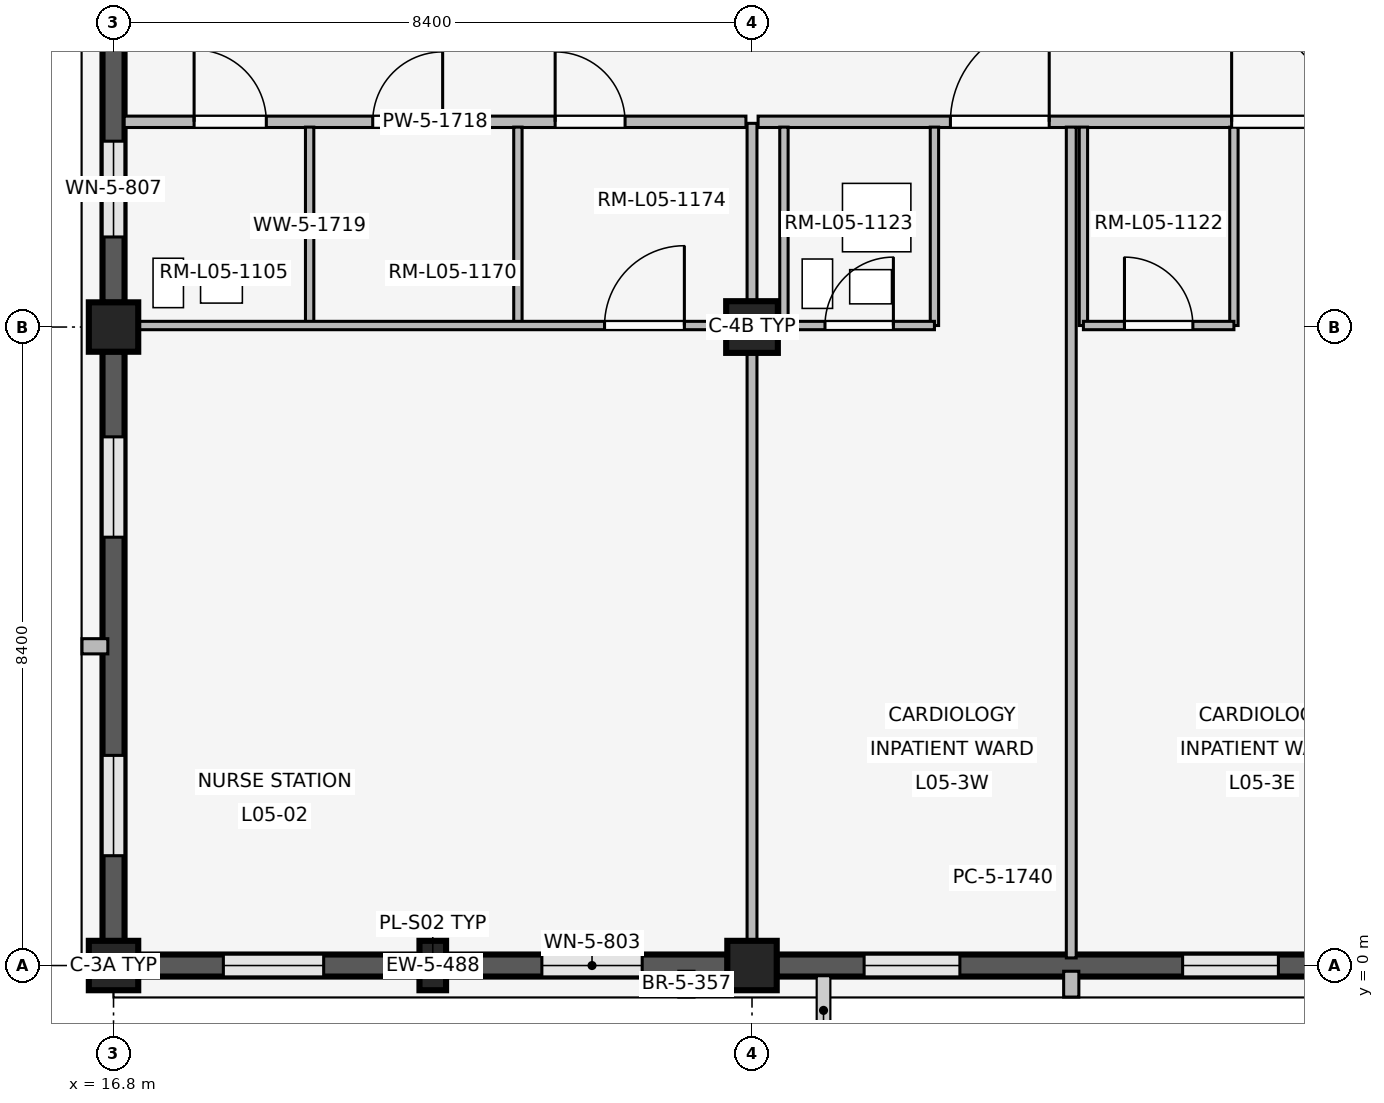
"""IFC4 building model, lengths in metres.
Left out: names, types, materials, properties, quantities, classifications, styles, units other than length and angle.
Written with IfcOpenShell. Run it as: python <this file> out.ifc"""

import sys

from ifc_helpers import new_model, si_unit, direction, frame, frame_2d, origin, origin_2d, place, context, subcontext, project, spatial, rectangle, extrude, element, fill, save


model = new_model("IFC4")
c1 = context("Model", 3, precision=1e-05, world=origin(), true_north=direction((0.0, 1.0)))
c2 = subcontext(c1, "Body", "Model", "MODEL_VIEW")
j1 = project(units=[si_unit("LENGTHUNIT", "METRE"), si_unit("PLANEANGLEUNIT", "RADIAN")], contexts=[c1])
p1 = place(None, origin())
s1 = spatial("IfcSite", under=j1, at=p1, CompositionType="ELEMENT")
p2 = place(p1, origin())
s2 = spatial("IfcBuilding", under=s1, at=p2, CompositionType="ELEMENT")
p3 = place(p2, frame((0.0, 0.0, 20.4)))
s3 = spatial("IfcBuildingStorey", under=s2, at=p3, CompositionType="ELEMENT", Elevation=20.4)
for number, where, z_axis, x_axis in (
    (1, (16.8, 0.0, 0.0), (0.0, 0.0, 1.0), (1.0, 0.0, 0.0)),
    (2, (16.8, 8.4, 0.0), (0.0, 0.0, 1.0), (1.0, 0.0, 0.0)),
    (3, (25.2, 0.0, 0.0), (0.0, 0.0, 1.0), (1.0, 0.0, 0.0)),
):
    element("IfcColumn", number, at=place(p3, frame(where, z_axis=z_axis, x_axis=x_axis)), inside=s3, PredefinedType="COLUMN", context=c2, shape_type="SweptSolid", body=[
        extrude(rectangle(XDim=0.65, YDim=0.65, at=origin_2d()), origin(), (0.0, 0.0, 1.0), 4.2),
    ])
p4 = place(p3, frame((25.2, 8.4, 0.0), z_axis=(0.0, 0.0, 1.0), x_axis=(1.0, 0.0, 0.0)))
e4 = element("IfcColumn", 4, at=p4, inside=s3, PredefinedType="COLUMN", context=c2, shape_type="SweptSolid", body=[
    extrude(rectangle(XDim=0.68, YDim=0.68, at=origin_2d()), origin(), (0.0, 0.0, 1.0), 4.2),
])
p5 = place(p3, frame((21.0, 0.0, 0.0), z_axis=(0.0, 0.0, 1.0), x_axis=(1.0, 0.0, 0.0)))
e5 = element("IfcColumn", 5, at=p5, inside=s3, PredefinedType="PILASTER", context=c2, shape_type="SweptSolid", body=[
    extrude(rectangle(XDim=0.35, YDim=0.65, at=origin_2d()), origin(), (0.0, 0.0, 1.0), 4.2),
])
p6 = place(p3, frame((24.88, 0.0, 0.0), z_axis=(0.0, 0.0, 1.0), x_axis=(-1.0, 0.0, 0.0)))
e6 = element("IfcWall", 6, at=p6, inside=s3, PredefinedType="SOLIDWALL", context=c2, shape_type="SweptSolid", body=[
    extrude(rectangle(XDim=7.76, YDim=0.29, at=frame_2d((3.88, 0.0))), origin(), (0.0, 0.0, 1.0), 3.34),
])
p7 = place(p6, frame((1.125, 0.0, 0.85)))
e7 = element("IfcOpeningElement", 7, at=p7, cuts=e6, PredefinedType="OPENING", context=c2, shape_type="SweptSolid", body=[
    extrude(rectangle(XDim=1.32, YDim=1.58, at=frame_2d((0.66, 0.79))), frame((0.0, 0.155, 0.0), z_axis=(0.0, -1.0, 0.0), x_axis=(1.0, 0.0, 0.0)), (0.0, 0.0, 1.0), 0.31),
])
p8 = place(p6, frame((5.315, 0.0, 0.85)))
e8 = element("IfcOpeningElement", 8, at=p8, cuts=e6, PredefinedType="OPENING", context=c2, shape_type="SweptSolid", body=[
    extrude(rectangle(XDim=1.32, YDim=1.58, at=frame_2d((0.66, 0.79))), frame((0.0, 0.155, 0.0), z_axis=(0.0, -1.0, 0.0), x_axis=(1.0, 0.0, 0.0)), (0.0, 0.0, 1.0), 0.31),
])
p9 = place(p3, frame((24.337, -0.075, 0.0), z_axis=(0.0, 0.0, 1.0), x_axis=(0.0, -1.0, 0.0)))
e9 = element("IfcWall", 9, at=p9, inside=s3, PredefinedType="ELEMENTEDWALL", context=c2, shape_type="SweptSolid", body=[
    extrude(rectangle(XDim=0.34, YDim=0.2, at=frame_2d((0.17, 0.0))), origin(), (0.0, 0.0, 1.0), 3.32),
])
p10 = place(p3, frame((16.8, 0.32, 0.0), z_axis=(0.0, 0.0, 1.0), x_axis=(0.0, 1.0, 0.0)))
e10 = element("IfcWall", 10, at=p10, inside=s3, PredefinedType="SOLIDWALL", context=c2, shape_type="SweptSolid", body=[
    extrude(rectangle(XDim=7.76, YDim=0.29, at=frame_2d((3.88, 0.0))), origin(), (0.0, 0.0, 1.0), 3.34),
])
p11 = place(p10, frame((1.125, 0.0, 0.85)))
e11 = element("IfcOpeningElement", 11, at=p11, cuts=e10, PredefinedType="OPENING", context=c2, shape_type="SweptSolid", body=[
    extrude(rectangle(XDim=1.32, YDim=1.58, at=frame_2d((0.66, 0.79))), frame((0.0, 0.155, 0.0), z_axis=(0.0, -1.0, 0.0), x_axis=(1.0, 0.0, 0.0)), (0.0, 0.0, 1.0), 0.31),
])
p12 = place(p10, frame((5.315, 0.0, 0.85)))
e12 = element("IfcOpeningElement", 12, at=p12, cuts=e10, PredefinedType="OPENING", context=c2, shape_type="SweptSolid", body=[
    extrude(rectangle(XDim=1.32, YDim=1.58, at=frame_2d((0.66, 0.79))), frame((0.0, 0.155, 0.0), z_axis=(0.0, -1.0, 0.0), x_axis=(1.0, 0.0, 0.0)), (0.0, 0.0, 1.0), 0.31),
])
p13 = place(p3, frame((16.725, 4.2, 0.0), z_axis=(0.0, 0.0, 1.0), x_axis=(-1.0, 0.0, 0.0)))
e13 = element("IfcWall", 13, at=p13, inside=s3, PredefinedType="ELEMENTEDWALL", context=c2, shape_type="SweptSolid", body=[
    extrude(rectangle(XDim=0.34, YDim=0.2, at=frame_2d((0.17, 0.0))), origin(), (0.0, 0.0, 1.0), 3.32),
])
p14 = place(p3, frame((16.8, 8.72, 0.0), z_axis=(0.0, 0.0, 1.0), x_axis=(0.0, 1.0, 0.0)))
e14 = element("IfcWall", 14, at=p14, inside=s3, PredefinedType="SOLIDWALL", context=c2, shape_type="SweptSolid", body=[
    extrude(rectangle(XDim=7.76, YDim=0.29, at=frame_2d((3.88, 0.0))), origin(), (0.0, 0.0, 1.0), 3.34),
])
p15 = place(p14, frame((0.865, 0.0, 0.85)))
e15 = element("IfcOpeningElement", 15, at=p15, cuts=e14, PredefinedType="OPENING", context=c2, shape_type="SweptSolid", body=[
    extrude(rectangle(XDim=1.26, YDim=1.52, at=frame_2d((0.63, 0.76))), frame((0.0, 0.155, 0.0), z_axis=(0.0, -1.0, 0.0), x_axis=(1.0, 0.0, 0.0)), (0.0, 0.0, 1.0), 0.31),
])
p16 = place(p14, frame((5.685, 0.0, 0.85)))
e16 = element("IfcOpeningElement", 16, at=p16, cuts=e14, PredefinedType="OPENING", context=c2, shape_type="SweptSolid", body=[
    extrude(rectangle(XDim=1.26, YDim=1.52, at=frame_2d((0.63, 0.76))), frame((0.0, 0.155, 0.0), z_axis=(0.0, -1.0, 0.0), x_axis=(1.0, 0.0, 0.0)), (0.0, 0.0, 1.0), 0.31),
])
p17 = place(p3, frame((33.28, 0.0, 0.0), z_axis=(0.0, 0.0, 1.0), x_axis=(-1.0, 0.0, 0.0)))
e17 = element("IfcWall", 17, at=p17, inside=s3, PredefinedType="SOLIDWALL", context=c2, shape_type="SweptSolid", body=[
    extrude(rectangle(XDim=7.76, YDim=0.29, at=frame_2d((3.88, 0.0))), origin(), (0.0, 0.0, 1.0), 3.34),
])
p18 = place(p17, frame((1.155, 0.0, 0.85)))
e18 = element("IfcOpeningElement", 18, at=p18, cuts=e17, PredefinedType="OPENING", context=c2, shape_type="SweptSolid", body=[
    extrude(rectangle(XDim=1.26, YDim=1.52, at=frame_2d((0.63, 0.76))), frame((0.0, 0.155, 0.0), z_axis=(0.0, -1.0, 0.0), x_axis=(1.0, 0.0, 0.0)), (0.0, 0.0, 1.0), 0.31),
])
p19 = place(p17, frame((5.345, 0.0, 0.85)))
e19 = element("IfcOpeningElement", 19, at=p19, cuts=e17, PredefinedType="OPENING", context=c2, shape_type="SweptSolid", body=[
    extrude(rectangle(XDim=1.26, YDim=1.52, at=frame_2d((0.63, 0.76))), frame((0.0, 0.155, 0.0), z_axis=(0.0, -1.0, 0.0), x_axis=(1.0, 0.0, 0.0)), (0.0, 0.0, 1.0), 0.31),
])
p20 = place(p3, frame((29.4, -0.075, 0.0), z_axis=(0.0, 0.0, 1.0), x_axis=(0.0, -1.0, 0.0)))
e20 = element("IfcWall", 20, at=p20, inside=s3, PredefinedType="ELEMENTEDWALL", context=c2, shape_type="SweptSolid", body=[
    extrude(rectangle(XDim=0.34, YDim=0.2, at=frame_2d((0.17, 0.0))), origin(), (0.0, 0.0, 1.0), 3.32),
])
p21 = place(p3, frame((16.94, 11.1, 0.0), z_axis=(0.0, 0.0, 1.0), x_axis=(1.0, 0.0, 0.0)))
e21 = element("IfcWall", 21, at=p21, inside=s3, PredefinedType="PARTITIONING", context=c2, shape_type="SweptSolid", body=[
    extrude(rectangle(XDim=8.18, YDim=0.15, at=frame_2d((4.09, 0.0))), origin(), (0.0, 0.0, 1.0), 3.32),
])
p22 = place(p21, frame((0.92, 0.0, 0.0)))
e22 = element("IfcOpeningElement", 22, at=p22, cuts=e21, PredefinedType="OPENING", context=c2, shape_type="SweptSolid", body=[
    extrude(rectangle(XDim=0.95, YDim=2.15, at=frame_2d((0.475, 1.075))), frame((0.0, 0.085, 0.0), z_axis=(0.0, -1.0, 0.0), x_axis=(1.0, 0.0, 0.0)), (0.0, 0.0, 1.0), 0.17),
])
p23 = place(p21, frame((3.27, 0.0, 0.0)))
e23 = element("IfcOpeningElement", 23, at=p23, cuts=e21, PredefinedType="OPENING", context=c2, shape_type="SweptSolid", body=[
    extrude(rectangle(XDim=0.92, YDim=2.1, at=frame_2d((0.46, 1.05))), frame((0.0, 0.085, 0.0), z_axis=(0.0, -1.0, 0.0), x_axis=(1.0, 0.0, 0.0)), (0.0, 0.0, 1.0), 0.17),
])
p24 = place(p21, frame((5.67, 0.0, 0.0)))
e24 = element("IfcOpeningElement", 24, at=p24, cuts=e21, PredefinedType="OPENING", context=c2, shape_type="SweptSolid", body=[
    extrude(rectangle(XDim=0.92, YDim=2.1, at=frame_2d((0.46, 1.05))), frame((0.0, 0.085, 0.0), z_axis=(0.0, -1.0, 0.0), x_axis=(1.0, 0.0, 0.0)), (0.0, 0.0, 1.0), 0.17),
])
for number, where, z_axis, x_axis in (
    (25, (19.38, 8.44, 0.0), (0.0, 0.0, 1.0), (0.0, 1.0, 0.0)),
    (26, (22.12, 8.44, 0.0), (0.0, 0.0, 1.0), (0.0, 1.0, 0.0)),
):
    element("IfcWall", number, at=place(p3, frame(where, z_axis=z_axis, x_axis=x_axis)), inside=s3, PredefinedType="PARTITIONING", context=c2, shape_type="SweptSolid", body=[
        extrude(rectangle(XDim=2.59, YDim=0.11, at=frame_2d((1.295, 0.0))), origin(), (0.0, 0.0, 1.0), 3.32),
    ])
p25 = place(p3, frame((16.94, 8.42, 0.0), z_axis=(0.0, 0.0, 1.0), x_axis=(1.0, 0.0, 0.0)))
e27 = element("IfcWall", 27, at=p25, inside=s3, PredefinedType="PARTITIONING", context=c2, shape_type="SweptSolid", body=[
    extrude(rectangle(XDim=8.18, YDim=0.11, at=frame_2d((4.09, 0.0))), origin(), (0.0, 0.0, 1.0), 3.32),
])
p26 = place(p25, frame((6.32, 0.0, 0.0)))
e28 = element("IfcOpeningElement", 28, at=p26, cuts=e27, PredefinedType="OPENING", context=c2, shape_type="SweptSolid", body=[
    extrude(rectangle(XDim=1.05, YDim=2.2, at=frame_2d((0.525, 1.1))), frame((0.0, 0.065, 0.0), z_axis=(0.0, -1.0, 0.0), x_axis=(1.0, 0.0, 0.0)), (0.0, 0.0, 1.0), 0.13),
])
p27 = place(p3, frame((25.2, 0.14, 0.0), z_axis=(0.0, 0.0, 1.0), x_axis=(0.0, 1.0, 0.0)))
e29 = element("IfcWall", 29, at=p27, inside=s3, PredefinedType="PARTITIONING", context=c2, shape_type="SweptSolid", body=[
    extrude(rectangle(XDim=10.94, YDim=0.13, at=frame_2d((5.47, 0.0))), origin(), (0.0, 0.0, 1.0), 3.32),
])
p28 = place(p3, frame((25.28, 11.1, 0.0), z_axis=(0.0, 0.0, 1.0), x_axis=(1.0, 0.0, 0.0)))
e30 = element("IfcWall", 30, at=p28, inside=s3, PredefinedType="PARTITIONING", context=c2, shape_type="SweptSolid", body=[
    extrude(rectangle(XDim=8.24, YDim=0.15, at=frame_2d((4.12, 0.0))), origin(), (0.0, 0.0, 1.0), 3.32),
])
p29 = place(p28, frame((2.53, 0.0, 0.0)))
e31 = element("IfcOpeningElement", 31, at=p29, cuts=e30, PredefinedType="OPENING", context=c2, shape_type="SweptSolid", body=[
    extrude(rectangle(XDim=1.3, YDim=2.25, at=frame_2d((0.65, 1.125))), frame((0.0, 0.085, 0.0), z_axis=(0.0, -1.0, 0.0), x_axis=(1.0, 0.0, 0.0)), (0.0, 0.0, 1.0), 0.17),
])
p30 = place(p28, frame((6.23, 0.0, 0.0)))
e32 = element("IfcOpeningElement", 32, at=p30, cuts=e30, PredefinedType="OPENING", context=c2, shape_type="SweptSolid", body=[
    extrude(rectangle(XDim=1.3, YDim=2.25, at=frame_2d((0.65, 1.125))), frame((0.0, 0.085, 0.0), z_axis=(0.0, -1.0, 0.0), x_axis=(1.0, 0.0, 0.0)), (0.0, 0.0, 1.0), 0.17),
])
p31 = place(p3, frame((29.4, 0.1, 0.0), z_axis=(0.0, 0.0, 1.0), x_axis=(0.0, 1.0, 0.0)))
e33 = element("IfcWall", 33, at=p31, inside=s3, PredefinedType="PARTITIONING", context=c2, shape_type="SweptSolid", body=[
    extrude(rectangle(XDim=10.93, YDim=0.13, at=frame_2d((5.465, 0.0))), origin(), (0.0, 0.0, 1.0), 3.32),
])
for number, where, z_axis, x_axis in (
    (34, (25.62, 8.42, 0.0), (0.0, 0.0, 1.0), (0.0, 1.0, 0.0)),
    (35, (27.6, 8.42, 0.0), (0.0, 0.0, 1.0), (0.0, 1.0, 0.0)),
):
    element("IfcWall", number, at=place(p3, frame(where, z_axis=z_axis, x_axis=x_axis)), inside=s3, PredefinedType="PARTITIONING", context=c2, shape_type="SweptSolid", body=[
        extrude(rectangle(XDim=2.61, YDim=0.11, at=frame_2d((1.305, 0.0))), origin(), (0.0, 0.0, 1.0), 3.32),
    ])
p32 = place(p3, frame((25.62, 8.42, 0.0), z_axis=(0.0, 0.0, 1.0), x_axis=(1.0, 0.0, 0.0)))
e36 = element("IfcWall", 36, at=p32, inside=s3, PredefinedType="PARTITIONING", context=c2, shape_type="SweptSolid", body=[
    extrude(rectangle(XDim=1.98, YDim=0.11, at=frame_2d((0.99, 0.0))), origin(), (0.0, 0.0, 1.0), 3.32),
])
p33 = place(p32, frame((0.54, 0.0, 0.0)))
e37 = element("IfcOpeningElement", 37, at=p33, cuts=e36, PredefinedType="OPENING", context=c2, shape_type="SweptSolid", body=[
    extrude(rectangle(XDim=0.9, YDim=2.1, at=frame_2d((0.45, 1.05))), frame((0.0, 0.065, 0.0), z_axis=(0.0, -1.0, 0.0), x_axis=(1.0, 0.0, 0.0)), (0.0, 0.0, 1.0), 0.13),
])
for number, where, z_axis, x_axis in (
    (38, (29.56, 8.42, 0.0), (0.0, 0.0, 1.0), (0.0, 1.0, 0.0)),
    (39, (31.54, 8.42, 0.0), (0.0, 0.0, 1.0), (0.0, 1.0, 0.0)),
):
    element("IfcWall", number, at=place(p3, frame(where, z_axis=z_axis, x_axis=x_axis)), inside=s3, PredefinedType="PARTITIONING", context=c2, shape_type="SweptSolid", body=[
        extrude(rectangle(XDim=2.61, YDim=0.11, at=frame_2d((1.305, 0.0))), origin(), (0.0, 0.0, 1.0), 3.32),
    ])
p34 = place(p3, frame((29.56, 8.42, 0.0), z_axis=(0.0, 0.0, 1.0), x_axis=(1.0, 0.0, 0.0)))
e40 = element("IfcWall", 40, at=p34, inside=s3, PredefinedType="PARTITIONING", context=c2, shape_type="SweptSolid", body=[
    extrude(rectangle(XDim=1.98, YDim=0.11, at=frame_2d((0.99, 0.0))), origin(), (0.0, 0.0, 1.0), 3.32),
])
p35 = place(p34, frame((0.54, 0.0, 0.0)))
e41 = element("IfcOpeningElement", 41, at=p35, cuts=e40, PredefinedType="OPENING", context=c2, shape_type="SweptSolid", body=[
    extrude(rectangle(XDim=0.9, YDim=2.1, at=frame_2d((0.45, 1.05))), frame((0.0, 0.065, 0.0), z_axis=(0.0, -1.0, 0.0), x_axis=(1.0, 0.0, 0.0)), (0.0, 0.0, 1.0), 0.13),
])
p36 = place(p3, frame((28.05, 1.15, 0.0), z_axis=(0.0, 0.0, 1.0), x_axis=(1.0, 0.0, 0.0)))
e42 = element("IfcWall", 42, at=p36, inside=s3, PredefinedType="PLUMBINGWALL", context=c2, shape_type="SweptSolid", body=[
    extrude(rectangle(XDim=0.9, YDim=0.24, at=frame_2d((0.45, 0.0))), origin(), (0.0, 0.0, 1.0), 3.32),
])
p37 = place(p7, origin())
e43 = element("IfcWindow", 43, at=p37, inside=s3, PartitioningType="SINGLE_PANEL", PredefinedType="WINDOW", context=c2, shape_type="SweptSolid", body=[
    extrude(rectangle(XDim=1.32, YDim=1.58, at=frame_2d((0.66, 0.79))), frame((0.0, 0.03, 0.0), z_axis=(0.0, -1.0, 0.0), x_axis=(1.0, 0.0, 0.0)), (0.0, 0.0, 1.0), 0.06),
])
fill(e7, e43)
p38 = place(p8, origin())
e44 = element("IfcWindow", 44, at=p38, inside=s3, PartitioningType="SINGLE_PANEL", PredefinedType="WINDOW", context=c2, shape_type="SweptSolid", body=[
    extrude(rectangle(XDim=1.32, YDim=1.58, at=frame_2d((0.66, 0.79))), frame((0.0, 0.03, 0.0), z_axis=(0.0, -1.0, 0.0), x_axis=(1.0, 0.0, 0.0)), (0.0, 0.0, 1.0), 0.06),
])
fill(e8, e44)
p39 = place(p11, origin())
e45 = element("IfcWindow", 45, at=p39, inside=s3, PartitioningType="SINGLE_PANEL", PredefinedType="WINDOW", context=c2, shape_type="SweptSolid", body=[
    extrude(rectangle(XDim=1.32, YDim=1.58, at=frame_2d((0.66, 0.79))), frame((0.0, 0.03, 0.0), z_axis=(0.0, -1.0, 0.0), x_axis=(1.0, 0.0, 0.0)), (0.0, 0.0, 1.0), 0.06),
])
fill(e11, e45)
p40 = place(p12, origin())
e46 = element("IfcWindow", 46, at=p40, inside=s3, PartitioningType="SINGLE_PANEL", PredefinedType="WINDOW", context=c2, shape_type="SweptSolid", body=[
    extrude(rectangle(XDim=1.32, YDim=1.58, at=frame_2d((0.66, 0.79))), frame((0.0, 0.03, 0.0), z_axis=(0.0, -1.0, 0.0), x_axis=(1.0, 0.0, 0.0)), (0.0, 0.0, 1.0), 0.06),
])
fill(e12, e46)
p41 = place(p15, origin())
e47 = element("IfcWindow", 47, at=p41, inside=s3, PartitioningType="SINGLE_PANEL", PredefinedType="WINDOW", context=c2, shape_type="SweptSolid", body=[
    extrude(rectangle(XDim=1.26, YDim=1.52, at=frame_2d((0.63, 0.76))), frame((0.0, 0.03, 0.0), z_axis=(0.0, -1.0, 0.0), x_axis=(1.0, 0.0, 0.0)), (0.0, 0.0, 1.0), 0.06),
])
fill(e15, e47)
p42 = place(p18, origin())
e48 = element("IfcWindow", 48, at=p42, inside=s3, PartitioningType="SINGLE_PANEL", PredefinedType="WINDOW", context=c2, shape_type="SweptSolid", body=[
    extrude(rectangle(XDim=1.26, YDim=1.52, at=frame_2d((0.63, 0.76))), frame((0.0, 0.03, 0.0), z_axis=(0.0, -1.0, 0.0), x_axis=(1.0, 0.0, 0.0)), (0.0, 0.0, 1.0), 0.06),
])
fill(e18, e48)
p43 = place(p19, origin())
e49 = element("IfcWindow", 49, at=p43, inside=s3, PartitioningType="SINGLE_PANEL", PredefinedType="WINDOW", context=c2, shape_type="SweptSolid", body=[
    extrude(rectangle(XDim=1.26, YDim=1.52, at=frame_2d((0.63, 0.76))), frame((0.0, 0.03, 0.0), z_axis=(0.0, -1.0, 0.0), x_axis=(1.0, 0.0, 0.0)), (0.0, 0.0, 1.0), 0.06),
])
fill(e19, e49)
p44 = place(p22, origin())
e50 = element("IfcDoor", 50, at=p44, inside=s3, OperationType="SINGLE_SWING_LEFT", PredefinedType="DOOR", context=c2, shape_type="SweptSolid", body=[
    extrude(rectangle(XDim=0.95, YDim=2.15, at=frame_2d((0.475, 1.075))), frame((0.0, 0.025, 0.0), z_axis=(0.0, -1.0, 0.0), x_axis=(1.0, 0.0, 0.0)), (0.0, 0.0, 1.0), 0.05),
])
fill(e22, e50)
p45 = place(p23, origin())
e51 = element("IfcDoor", 51, at=p45, inside=s3, OperationType="SINGLE_SWING_RIGHT", PredefinedType="DOOR", context=c2, shape_type="SweptSolid", body=[
    extrude(rectangle(XDim=0.92, YDim=2.1, at=frame_2d((0.46, 1.05))), frame((0.0, 0.025, 0.0), z_axis=(0.0, -1.0, 0.0), x_axis=(1.0, 0.0, 0.0)), (0.0, 0.0, 1.0), 0.05),
])
fill(e23, e51)
p46 = place(p24, origin())
e52 = element("IfcDoor", 52, at=p46, inside=s3, OperationType="SINGLE_SWING_LEFT", PredefinedType="DOOR", context=c2, shape_type="SweptSolid", body=[
    extrude(rectangle(XDim=0.92, YDim=2.1, at=frame_2d((0.46, 1.05))), frame((0.0, 0.025, 0.0), z_axis=(0.0, -1.0, 0.0), x_axis=(1.0, 0.0, 0.0)), (0.0, 0.0, 1.0), 0.05),
])
fill(e24, e52)
p47 = place(p26, origin())
e53 = element("IfcDoor", 53, at=p47, inside=s3, OperationType="SINGLE_SWING_RIGHT", PredefinedType="DOOR", context=c2, shape_type="SweptSolid", body=[
    extrude(rectangle(XDim=1.05, YDim=2.2, at=frame_2d((0.525, 1.1))), frame((0.0, 0.025, 0.0), z_axis=(0.0, -1.0, 0.0), x_axis=(1.0, 0.0, 0.0)), (0.0, 0.0, 1.0), 0.05),
])
fill(e28, e53)
p48 = place(p29, origin())
e54 = element("IfcDoor", 54, at=p48, inside=s3, OperationType="SINGLE_SWING_RIGHT", PredefinedType="DOOR", context=c2, shape_type="SweptSolid", body=[
    extrude(rectangle(XDim=1.3, YDim=2.25, at=frame_2d((0.65, 1.125))), frame((0.0, 0.025, 0.0), z_axis=(0.0, -1.0, 0.0), x_axis=(1.0, 0.0, 0.0)), (0.0, 0.0, 1.0), 0.05),
])
fill(e31, e54)
p49 = place(p30, origin())
e55 = element("IfcDoor", 55, at=p49, inside=s3, OperationType="SINGLE_SWING_LEFT", PredefinedType="DOOR", context=c2, shape_type="SweptSolid", body=[
    extrude(rectangle(XDim=1.3, YDim=2.25, at=frame_2d((0.65, 1.125))), frame((0.0, 0.025, 0.0), z_axis=(0.0, -1.0, 0.0), x_axis=(1.0, 0.0, 0.0)), (0.0, 0.0, 1.0), 0.05),
])
fill(e32, e55)
p50 = place(p33, origin())
e56 = element("IfcDoor", 56, at=p50, inside=s3, OperationType="SINGLE_SWING_RIGHT", PredefinedType="DOOR", context=c2, shape_type="SweptSolid", body=[
    extrude(rectangle(XDim=0.9, YDim=2.1, at=frame_2d((0.45, 1.05))), frame((0.0, 0.025, 0.0), z_axis=(0.0, -1.0, 0.0), x_axis=(1.0, 0.0, 0.0)), (0.0, 0.0, 1.0), 0.05),
])
fill(e37, e56)
p51 = place(p35, origin())
e57 = element("IfcDoor", 57, at=p51, inside=s3, OperationType="SINGLE_SWING_LEFT", PredefinedType="DOOR", context=c2, shape_type="SweptSolid", body=[
    extrude(rectangle(XDim=0.9, YDim=2.1, at=frame_2d((0.45, 1.05))), frame((0.0, 0.025, 0.0), z_axis=(0.0, -1.0, 0.0), x_axis=(1.0, 0.0, 0.0)), (0.0, 0.0, 1.0), 0.05),
])
fill(e41, e57)
save(model, sys.argv[1])
